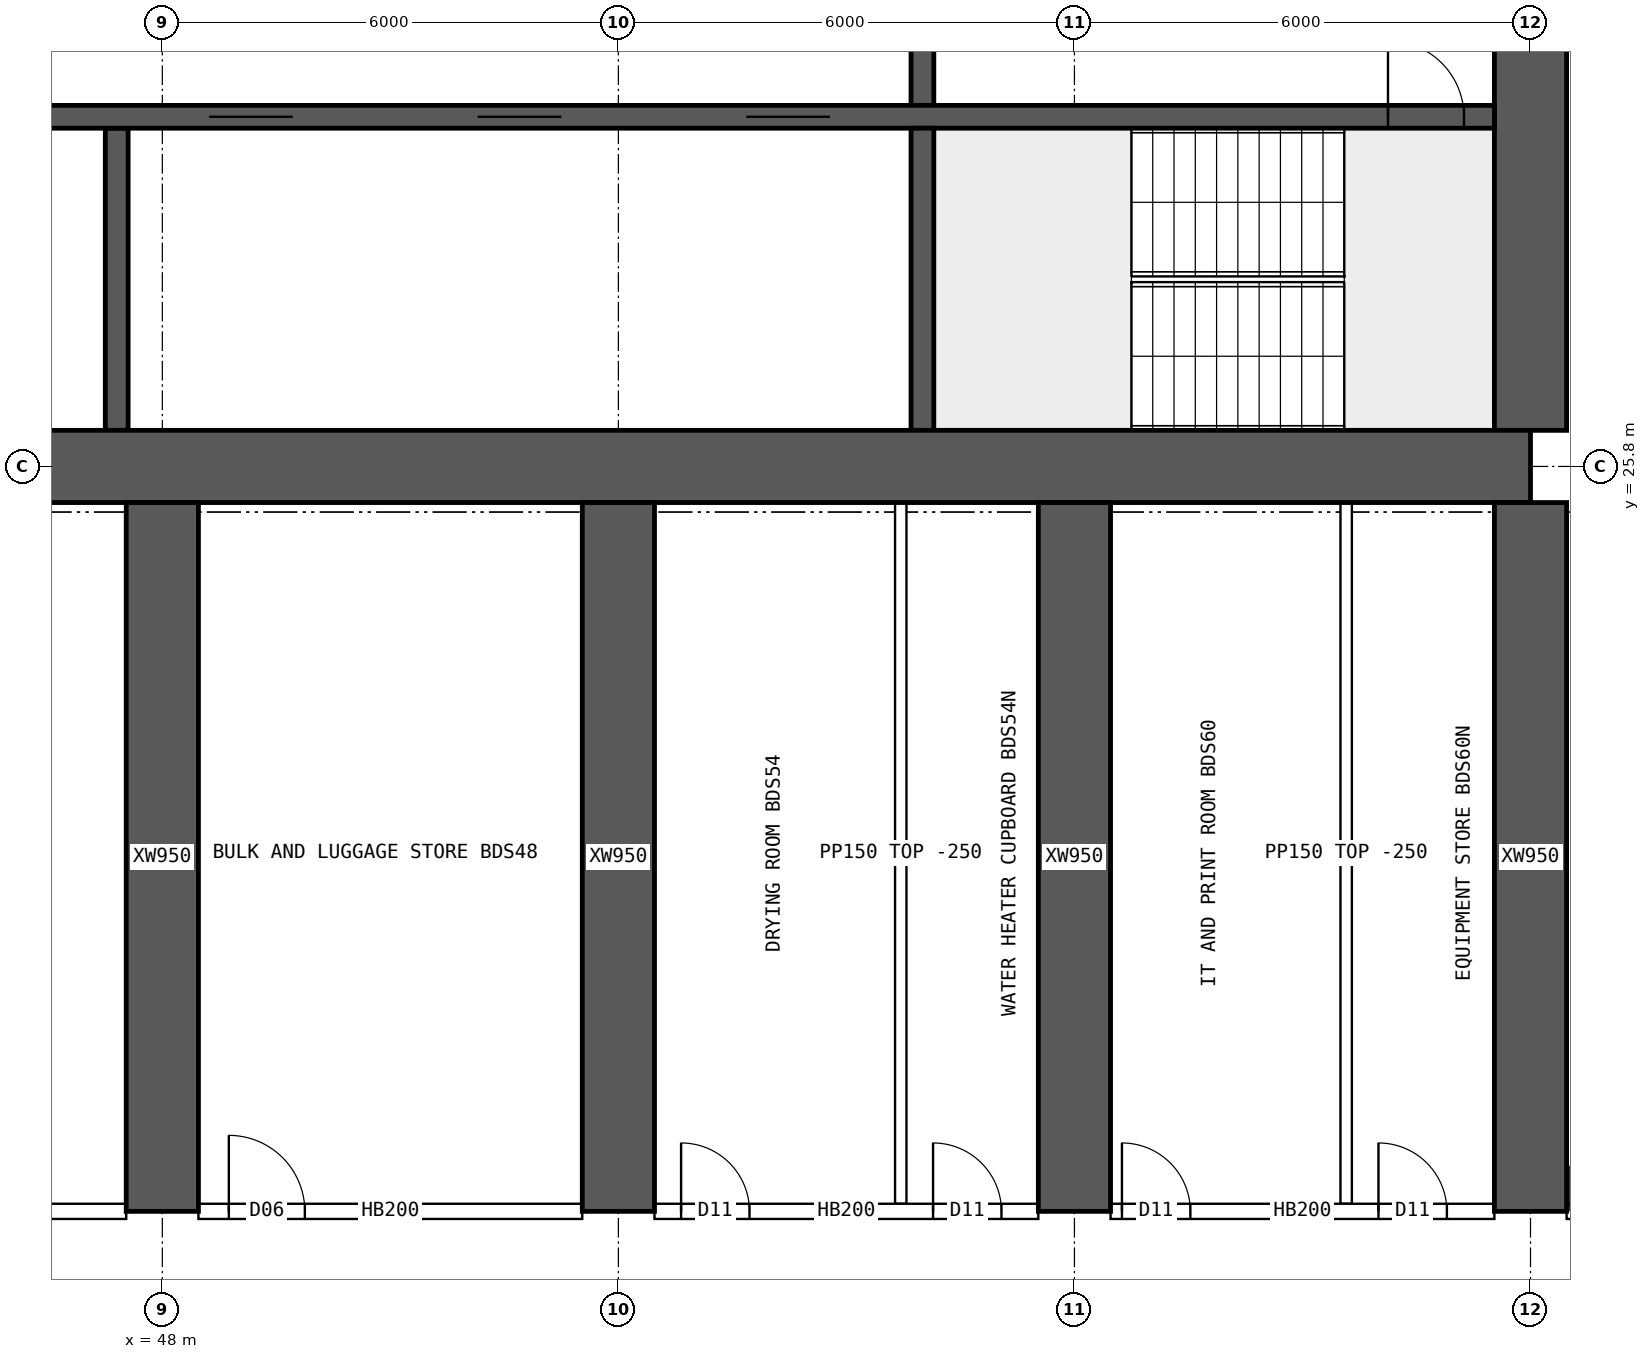
"""IFC4 building model, lengths in metres.
Left out: names, types, materials, properties, quantities, classifications, styles, units other than length and angle.
Written with IfcOpenShell. Run it as: python <this file> out.ifc"""

import sys

from ifc_helpers import new_model, si_unit, direction, frame, frame_2d, origin, place, context, subcontext, project, spatial, rectangle, extrude, element, fill, save


model = new_model("IFC4")
c1 = context("Model", 3, precision=1e-05, world=origin(), true_north=direction((0.0, 1.0)))
c2 = subcontext(c1, "Body", "Model", "MODEL_VIEW")
j1 = project(units=[si_unit("LENGTHUNIT", "METRE"), si_unit("PLANEANGLEUNIT", "RADIAN")], contexts=[c1])
p1 = place(None, origin())
s1 = spatial("IfcSite", under=j1, at=p1, CompositionType="ELEMENT")
p2 = place(p1, origin())
s2 = spatial("IfcBuilding", under=s1, at=p2, CompositionType="ELEMENT")
p3 = place(p2, frame((0.0, 0.0, 88.15)))
s3 = spatial("IfcBuildingStorey", under=s2, at=p3, CompositionType="ELEMENT", Elevation=88.15)
p4 = place(p3, frame((18.0, 25.8, 0.0), z_axis=(0.0, 0.0, 1.0), x_axis=(1.0, 0.0, 0.0)))
e1 = element("IfcWall", 1, at=p4, inside=s3, PredefinedType="SHEAR", context=c2, shape_type="SweptSolid", body=[
    extrude(rectangle(XDim=48.0, YDim=0.95, at=frame_2d((24.0, 0.0))), origin(), (0.0, 0.0, 1.0), 3.75),
])
p5 = place(p3, frame((66.0, 26.275, 0.0), z_axis=(0.0, 0.0, 1.0), x_axis=(0.0, 1.0, 0.0)))
e2 = element("IfcWall", 2, at=p5, inside=s3, PredefinedType="SHEAR", context=c2, shape_type="SweptSolid", body=[
    extrude(rectangle(XDim=11.45, YDim=0.95, at=frame_2d((5.725, 0.0))), origin(), (0.0, 0.0, 1.0), 3.75),
])
p6 = place(p5, frame((5.025, 0.0, 0.0)))
e3 = element("IfcOpeningElement", 3, at=p6, cuts=e2, PredefinedType="OPENING", context=c2, shape_type="SweptSolid", body=[
    extrude(rectangle(XDim=1.2, YDim=2.1, at=frame_2d((0.6, 1.05))), frame((0.0, 0.485, 0.0), z_axis=(0.0, -1.0, 0.0), x_axis=(1.0, 0.0, 0.0)), (0.0, 0.0, 1.0), 0.97),
])
p7 = place(p3, frame((18.475, 30.4, 0.0), z_axis=(0.0, 0.0, 1.0), x_axis=(1.0, 0.0, 0.0)))
e4 = element("IfcWall", 4, at=p7, inside=s3, PredefinedType="SHEAR", context=c2, shape_type="SweptSolid", body=[
    extrude(rectangle(XDim=47.05, YDim=0.3, at=frame_2d((23.525, 0.0))), origin(), (0.0, 0.0, 1.0), 3.75),
])
p8 = place(p7, frame((0.4, 0.0, 0.0)))
e5 = element("IfcOpeningElement", 5, at=p8, cuts=e4, PredefinedType="OPENING", context=c2, shape_type="SweptSolid", body=[
    extrude(rectangle(XDim=1.0, YDim=2.1, at=frame_2d((0.5, 1.05))), frame((0.0, 0.16, 0.0), z_axis=(0.0, -1.0, 0.0), x_axis=(1.0, 0.0, 0.0)), (0.0, 0.0, 1.0), 0.32),
])
p9 = place(p7, frame((45.65, 0.0, 0.0)))
e6 = element("IfcOpeningElement", 6, at=p9, cuts=e4, PredefinedType="OPENING", context=c2, shape_type="SweptSolid", body=[
    extrude(rectangle(XDim=1.0, YDim=2.1, at=frame_2d((0.5, 1.05))), frame((0.0, 0.16, 0.0), z_axis=(0.0, -1.0, 0.0), x_axis=(1.0, 0.0, 0.0)), (0.0, 0.0, 1.0), 0.32),
])
p10 = place(p7, frame((8.275, 0.0, 0.0)))
e7 = element("IfcOpeningElement", 7, at=p10, cuts=e4, PredefinedType="OPENING", context=c2, shape_type="SweptSolid", body=[
    extrude(rectangle(XDim=1.1, YDim=2.1, at=frame_2d((0.55, 1.05))), frame((0.0, 0.16, 0.0), z_axis=(0.0, -1.0, 0.0), x_axis=(1.0, 0.0, 0.0)), (0.0, 0.0, 1.0), 0.32),
])
p11 = place(p7, frame((10.875, 0.0, 0.0)))
e8 = element("IfcOpeningElement", 8, at=p11, cuts=e4, PredefinedType="OPENING", context=c2, shape_type="SweptSolid", body=[
    extrude(rectangle(XDim=1.1, YDim=2.1, at=frame_2d((0.55, 1.05))), frame((0.0, 0.16, 0.0), z_axis=(0.0, -1.0, 0.0), x_axis=(1.0, 0.0, 0.0)), (0.0, 0.0, 1.0), 0.32),
])
p12 = place(p7, frame((13.475, 0.0, 0.0)))
e9 = element("IfcOpeningElement", 9, at=p12, cuts=e4, PredefinedType="OPENING", context=c2, shape_type="SweptSolid", body=[
    extrude(rectangle(XDim=1.1, YDim=2.1, at=frame_2d((0.55, 1.05))), frame((0.0, 0.16, 0.0), z_axis=(0.0, -1.0, 0.0), x_axis=(1.0, 0.0, 0.0)), (0.0, 0.0, 1.0), 0.32),
])
p13 = place(p7, frame((16.075, 0.0, 0.0)))
e10 = element("IfcOpeningElement", 10, at=p13, cuts=e4, PredefinedType="OPENING", context=c2, shape_type="SweptSolid", body=[
    extrude(rectangle(XDim=1.1, YDim=2.1, at=frame_2d((0.55, 1.05))), frame((0.0, 0.16, 0.0), z_axis=(0.0, -1.0, 0.0), x_axis=(1.0, 0.0, 0.0)), (0.0, 0.0, 1.0), 0.32),
])
p14 = place(p7, frame((18.85, 0.0, 0.0)))
e11 = element("IfcOpeningElement", 11, at=p14, cuts=e4, PredefinedType="OPENING", context=c2, shape_type="SweptSolid", body=[
    extrude(rectangle(XDim=0.9, YDim=2.1, at=frame_2d((0.45, 1.05))), frame((0.0, 0.16, 0.0), z_axis=(0.0, -1.0, 0.0), x_axis=(1.0, 0.0, 0.0)), (0.0, 0.0, 1.0), 0.32),
])
p15 = place(p7, frame((30.142, 0.0, 0.0)))
e12 = element("IfcOpeningElement", 12, at=p15, cuts=e4, PredefinedType="OPENING", context=c2, shape_type="SweptSolid", body=[
    extrude(rectangle(XDim=1.1, YDim=2.1, at=frame_2d((0.55, 1.05))), frame((0.0, 0.16, 0.0), z_axis=(0.0, -1.0, 0.0), x_axis=(1.0, 0.0, 0.0)), (0.0, 0.0, 1.0), 0.32),
])
p16 = place(p7, frame((33.675, 0.0, 0.0)))
e13 = element("IfcOpeningElement", 13, at=p16, cuts=e4, PredefinedType="OPENING", context=c2, shape_type="SweptSolid", body=[
    extrude(rectangle(XDim=1.1, YDim=2.1, at=frame_2d((0.55, 1.05))), frame((0.0, 0.16, 0.0), z_axis=(0.0, -1.0, 0.0), x_axis=(1.0, 0.0, 0.0)), (0.0, 0.0, 1.0), 0.32),
])
p17 = place(p7, frame((37.208, 0.0, 0.0)))
e14 = element("IfcOpeningElement", 14, at=p17, cuts=e4, PredefinedType="OPENING", context=c2, shape_type="SweptSolid", body=[
    extrude(rectangle(XDim=1.1, YDim=2.1, at=frame_2d((0.55, 1.05))), frame((0.0, 0.16, 0.0), z_axis=(0.0, -1.0, 0.0), x_axis=(1.0, 0.0, 0.0)), (0.0, 0.0, 1.0), 0.32),
])
p18 = place(p3, frame((58.0, 26.275, 0.0), z_axis=(0.0, 0.0, 1.0), x_axis=(0.0, 1.0, 0.0)))
e15 = element("IfcWall", 15, at=p18, inside=s3, PredefinedType="SHEAR", context=c2, shape_type="SweptSolid", body=[
    extrude(rectangle(XDim=3.975, YDim=0.3, at=frame_2d((1.988, 0.0))), origin(), (0.0, 0.0, 1.0), 3.75),
])
p19 = place(p3, frame((58.0, 30.55, 0.0), z_axis=(0.0, 0.0, 1.0), x_axis=(0.0, 1.0, 0.0)))
e16 = element("IfcWall", 16, at=p19, inside=s3, PredefinedType="SHEAR", context=c2, shape_type="SweptSolid", body=[
    extrude(rectangle(XDim=3.9, YDim=0.3, at=frame_2d((1.95, 0.0))), origin(), (0.0, 0.0, 1.0), 3.75),
])
p20 = place(p19, frame((1.4, 0.0, 0.0)))
e17 = element("IfcOpeningElement", 17, at=p20, cuts=e16, PredefinedType="OPENING", context=c2, shape_type="SweptSolid", body=[
    extrude(rectangle(XDim=1.2, YDim=2.1, at=frame_2d((0.6, 1.05))), frame((0.0, 0.16, 0.0), z_axis=(0.0, -1.0, 0.0), x_axis=(1.0, 0.0, 0.0)), (0.0, 0.0, 1.0), 0.32),
])
p21 = place(p3, frame((47.4, 26.275, 0.0), z_axis=(0.0, 0.0, 1.0), x_axis=(0.0, 1.0, 0.0)))
e18 = element("IfcWall", 18, at=p21, inside=s3, PredefinedType="SHEAR", context=c2, shape_type="SweptSolid", body=[
    extrude(rectangle(XDim=3.975, YDim=0.3, at=frame_2d((1.988, 0.0))), origin(), (0.0, 0.0, 1.0), 3.75),
])
for number, where, z_axis, x_axis in (
    (19, (48.0, 16.0, 0.0), (0.0, 0.0, 1.0), (0.0, 1.0, 0.0)),
    (20, (54.0, 16.0, 0.0), (0.0, 0.0, 1.0), (0.0, 1.0, 0.0)),
    (21, (60.0, 16.0, 0.0), (0.0, 0.0, 1.0), (0.0, 1.0, 0.0)),
    (22, (66.0, 16.0, 0.0), (0.0, 0.0, 1.0), (0.0, 1.0, 0.0)),
):
    element("IfcWall", number, at=place(p3, frame(where, z_axis=z_axis, x_axis=x_axis)), inside=s3, PredefinedType="SHEAR", context=c2, shape_type="SweptSolid", body=[
        extrude(rectangle(XDim=9.325, YDim=0.95, at=frame_2d((4.663, 0.0))), origin(), (0.0, 0.0, 1.0), 3.75),
    ])
p22 = place(p3, frame((42.475, 16.0, 0.0), z_axis=(0.0, 0.0, 1.0), x_axis=(1.0, 0.0, 0.0)))
e23 = element("IfcWall", 23, at=p22, inside=s3, PredefinedType="SOLIDWALL", context=c2, shape_type="SweptSolid", body=[
    extrude(rectangle(XDim=5.05, YDim=0.2, at=frame_2d((2.525, 0.0))), origin(), (0.0, 0.0, 1.0), 3.5),
])
p23 = place(p22, frame((0.35, 0.0, 0.0)))
e24 = element("IfcOpeningElement", 24, at=p23, cuts=e23, PredefinedType="OPENING", context=c2, shape_type="SweptSolid", body=[
    extrude(rectangle(XDim=0.9, YDim=2.1, at=frame_2d((0.45, 1.05))), frame((0.0, 0.11, 0.0), z_axis=(0.0, -1.0, 0.0), x_axis=(1.0, 0.0, 0.0)), (0.0, 0.0, 1.0), 0.22),
])
p24 = place(p22, frame((2.705, 0.0, 0.0)))
e25 = element("IfcOpeningElement", 25, at=p24, cuts=e23, PredefinedType="OPENING", context=c2, shape_type="SweptSolid", body=[
    extrude(rectangle(XDim=0.9, YDim=2.1, at=frame_2d((0.45, 1.05))), frame((0.0, 0.11, 0.0), z_axis=(0.0, -1.0, 0.0), x_axis=(1.0, 0.0, 0.0)), (0.0, 0.0, 1.0), 0.22),
])
p25 = place(p3, frame((48.475, 16.0, 0.0), z_axis=(0.0, 0.0, 1.0), x_axis=(1.0, 0.0, 0.0)))
e26 = element("IfcWall", 26, at=p25, inside=s3, PredefinedType="SOLIDWALL", context=c2, shape_type="SweptSolid", body=[
    extrude(rectangle(XDim=5.05, YDim=0.2, at=frame_2d((2.525, 0.0))), origin(), (0.0, 0.0, 1.0), 3.5),
])
p26 = place(p25, frame((0.4, 0.0, 0.0)))
e27 = element("IfcOpeningElement", 27, at=p26, cuts=e26, PredefinedType="OPENING", context=c2, shape_type="SweptSolid", body=[
    extrude(rectangle(XDim=1.0, YDim=2.1, at=frame_2d((0.5, 1.05))), frame((0.0, 0.11, 0.0), z_axis=(0.0, -1.0, 0.0), x_axis=(1.0, 0.0, 0.0)), (0.0, 0.0, 1.0), 0.22),
])
p27 = place(p3, frame((54.475, 16.0, 0.0), z_axis=(0.0, 0.0, 1.0), x_axis=(1.0, 0.0, 0.0)))
e28 = element("IfcWall", 28, at=p27, inside=s3, PredefinedType="SOLIDWALL", context=c2, shape_type="SweptSolid", body=[
    extrude(rectangle(XDim=5.05, YDim=0.2, at=frame_2d((2.525, 0.0))), origin(), (0.0, 0.0, 1.0), 3.5),
])
p28 = place(p27, frame((0.35, 0.0, 0.0)))
e29 = element("IfcOpeningElement", 29, at=p28, cuts=e28, PredefinedType="OPENING", context=c2, shape_type="SweptSolid", body=[
    extrude(rectangle(XDim=0.9, YDim=2.1, at=frame_2d((0.45, 1.05))), frame((0.0, 0.11, 0.0), z_axis=(0.0, -1.0, 0.0), x_axis=(1.0, 0.0, 0.0)), (0.0, 0.0, 1.0), 0.22),
])
p29 = place(p27, frame((3.665, 0.0, 0.0)))
e30 = element("IfcOpeningElement", 30, at=p29, cuts=e28, PredefinedType="OPENING", context=c2, shape_type="SweptSolid", body=[
    extrude(rectangle(XDim=0.9, YDim=2.1, at=frame_2d((0.45, 1.05))), frame((0.0, 0.11, 0.0), z_axis=(0.0, -1.0, 0.0), x_axis=(1.0, 0.0, 0.0)), (0.0, 0.0, 1.0), 0.22),
])
p30 = place(p3, frame((60.475, 16.0, 0.0), z_axis=(0.0, 0.0, 1.0), x_axis=(1.0, 0.0, 0.0)))
e31 = element("IfcWall", 31, at=p30, inside=s3, PredefinedType="SOLIDWALL", context=c2, shape_type="SweptSolid", body=[
    extrude(rectangle(XDim=5.05, YDim=0.2, at=frame_2d((2.525, 0.0))), origin(), (0.0, 0.0, 1.0), 3.5),
])
p31 = place(p30, frame((0.15, 0.0, 0.0)))
e32 = element("IfcOpeningElement", 32, at=p31, cuts=e31, PredefinedType="OPENING", context=c2, shape_type="SweptSolid", body=[
    extrude(rectangle(XDim=0.9, YDim=2.1, at=frame_2d((0.45, 1.05))), frame((0.0, 0.11, 0.0), z_axis=(0.0, -1.0, 0.0), x_axis=(1.0, 0.0, 0.0)), (0.0, 0.0, 1.0), 0.22),
])
p32 = place(p30, frame((3.525, 0.0, 0.0)))
e33 = element("IfcOpeningElement", 33, at=p32, cuts=e31, PredefinedType="OPENING", context=c2, shape_type="SweptSolid", body=[
    extrude(rectangle(XDim=0.9, YDim=2.1, at=frame_2d((0.45, 1.05))), frame((0.0, 0.11, 0.0), z_axis=(0.0, -1.0, 0.0), x_axis=(1.0, 0.0, 0.0)), (0.0, 0.0, 1.0), 0.22),
])
p33 = place(p3, frame((66.475, 16.0, 0.0), z_axis=(0.0, 0.0, 1.0), x_axis=(1.0, 0.0, 0.0)))
e34 = element("IfcWall", 34, at=p33, inside=s3, PredefinedType="SOLIDWALL", context=c2, shape_type="SweptSolid", body=[
    extrude(rectangle(XDim=1.925, YDim=0.2, at=frame_2d((0.962, 0.0))), origin(), (0.0, 0.0, 1.0), 3.5),
])
p34 = place(p33, frame((0.05, 0.0, 0.0)))
e35 = element("IfcOpeningElement", 35, at=p34, cuts=e34, PredefinedType="OPENING", context=c2, shape_type="SweptSolid", body=[
    extrude(rectangle(XDim=1.2, YDim=2.1, at=frame_2d((0.6, 1.05))), frame((0.0, 0.11, 0.0), z_axis=(0.0, -1.0, 0.0), x_axis=(1.0, 0.0, 0.0)), (0.0, 0.0, 1.0), 0.22),
])
for number, where, z_axis, x_axis in (
    (36, (57.715, 16.1, 0.0), (0.0, 0.0, 1.0), (0.0, 1.0, 0.0)),
    (37, (63.575, 16.1, 0.0), (0.0, 0.0, 1.0), (0.0, 1.0, 0.0)),
):
    element("IfcWall", number, at=place(p3, frame(where, z_axis=z_axis, x_axis=x_axis)), inside=s3, PredefinedType="PARTITIONING", context=c2, shape_type="SweptSolid", body=[
        extrude(rectangle(XDim=9.225, YDim=0.15, at=frame_2d((4.612, 0.0))), origin(), (0.0, 0.0, 1.0), 3.5),
    ])
p35 = place(p9, origin())
e38 = element("IfcDoor", 38, at=p35, inside=s3, OperationType="SINGLE_SWING_LEFT", PredefinedType="DOOR", context=c2, shape_type="SweptSolid", body=[
    extrude(rectangle(XDim=1.0, YDim=2.1, at=frame_2d((0.5, 1.05))), frame((0.0, 0.025, 0.0), z_axis=(0.0, -1.0, 0.0), x_axis=(1.0, 0.0, 0.0)), (0.0, 0.0, 1.0), 0.05),
])
fill(e6, e38)
p36 = place(p15, origin())
e39 = element("IfcDoor", 39, at=p36, inside=s3, OperationType="DOUBLE_DOOR_SLIDING", PredefinedType="DOOR", context=c2, shape_type="SweptSolid", body=[
    extrude(rectangle(XDim=1.1, YDim=2.1, at=frame_2d((0.55, 1.05))), frame((0.0, 0.025, 0.0), z_axis=(0.0, -1.0, 0.0), x_axis=(1.0, 0.0, 0.0)), (0.0, 0.0, 1.0), 0.05),
])
fill(e12, e39)
p37 = place(p16, origin())
e40 = element("IfcDoor", 40, at=p37, inside=s3, OperationType="DOUBLE_DOOR_SLIDING", PredefinedType="DOOR", context=c2, shape_type="SweptSolid", body=[
    extrude(rectangle(XDim=1.1, YDim=2.1, at=frame_2d((0.55, 1.05))), frame((0.0, 0.025, 0.0), z_axis=(0.0, -1.0, 0.0), x_axis=(1.0, 0.0, 0.0)), (0.0, 0.0, 1.0), 0.05),
])
fill(e13, e40)
p38 = place(p17, origin())
e41 = element("IfcDoor", 41, at=p38, inside=s3, OperationType="DOUBLE_DOOR_SLIDING", PredefinedType="DOOR", context=c2, shape_type="SweptSolid", body=[
    extrude(rectangle(XDim=1.1, YDim=2.1, at=frame_2d((0.55, 1.05))), frame((0.0, 0.025, 0.0), z_axis=(0.0, -1.0, 0.0), x_axis=(1.0, 0.0, 0.0)), (0.0, 0.0, 1.0), 0.05),
])
fill(e14, e41)
p39 = place(p26, origin())
e42 = element("IfcDoor", 42, at=p39, inside=s3, OperationType="SINGLE_SWING_LEFT", PredefinedType="DOOR", context=c2, shape_type="SweptSolid", body=[
    extrude(rectangle(XDim=1.0, YDim=2.1, at=frame_2d((0.5, 1.05))), frame((0.0, 0.025, 0.0), z_axis=(0.0, -1.0, 0.0), x_axis=(1.0, 0.0, 0.0)), (0.0, 0.0, 1.0), 0.05),
])
fill(e27, e42)
p40 = place(p28, origin())
e43 = element("IfcDoor", 43, at=p40, inside=s3, OperationType="SINGLE_SWING_LEFT", PredefinedType="DOOR", context=c2, shape_type="SweptSolid", body=[
    extrude(rectangle(XDim=0.9, YDim=2.1, at=frame_2d((0.45, 1.05))), frame((0.0, 0.025, 0.0), z_axis=(0.0, -1.0, 0.0), x_axis=(1.0, 0.0, 0.0)), (0.0, 0.0, 1.0), 0.05),
])
fill(e29, e43)
p41 = place(p29, origin())
e44 = element("IfcDoor", 44, at=p41, inside=s3, OperationType="SINGLE_SWING_LEFT", PredefinedType="DOOR", context=c2, shape_type="SweptSolid", body=[
    extrude(rectangle(XDim=0.9, YDim=2.1, at=frame_2d((0.45, 1.05))), frame((0.0, 0.025, 0.0), z_axis=(0.0, -1.0, 0.0), x_axis=(1.0, 0.0, 0.0)), (0.0, 0.0, 1.0), 0.05),
])
fill(e30, e44)
p42 = place(p31, origin())
e45 = element("IfcDoor", 45, at=p42, inside=s3, OperationType="SINGLE_SWING_LEFT", PredefinedType="DOOR", context=c2, shape_type="SweptSolid", body=[
    extrude(rectangle(XDim=0.9, YDim=2.1, at=frame_2d((0.45, 1.05))), frame((0.0, 0.025, 0.0), z_axis=(0.0, -1.0, 0.0), x_axis=(1.0, 0.0, 0.0)), (0.0, 0.0, 1.0), 0.05),
])
fill(e32, e45)
p43 = place(p32, origin())
e46 = element("IfcDoor", 46, at=p43, inside=s3, OperationType="SINGLE_SWING_LEFT", PredefinedType="DOOR", context=c2, shape_type="SweptSolid", body=[
    extrude(rectangle(XDim=0.9, YDim=2.1, at=frame_2d((0.45, 1.05))), frame((0.0, 0.025, 0.0), z_axis=(0.0, -1.0, 0.0), x_axis=(1.0, 0.0, 0.0)), (0.0, 0.0, 1.0), 0.05),
])
fill(e33, e46)
save(model, sys.argv[1])
